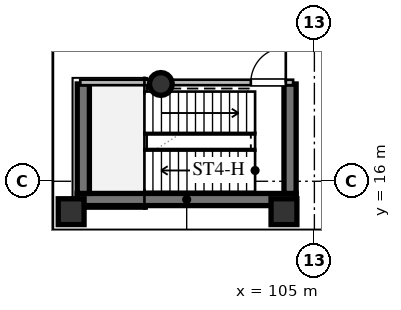
"""IFC4 building model, lengths in metres.
Left out: names, types, materials, properties, quantities, classifications, styles, units other than length and angle.
Written with IfcOpenShell. Run it as: python <this file> out.ifc"""

import sys

from ifc_helpers import new_model, si_unit, direction, frame, frame_2d, origin, origin_2d, place, context, subcontext, project, spatial, rectangle, circle, extrude, element, fill, save


model = new_model("IFC4")
c1 = context("Model", 3, precision=1e-05, world=origin(), true_north=direction((0.0, 1.0)))
c2 = subcontext(c1, "Body", "Model", "MODEL_VIEW")
j1 = project(units=[si_unit("LENGTHUNIT", "METRE"), si_unit("PLANEANGLEUNIT", "RADIAN")], contexts=[c1])
p1 = place(None, origin())
s1 = spatial("IfcSite", under=j1, at=p1, CompositionType="ELEMENT")
p2 = place(p1, origin())
s2 = spatial("IfcBuilding", under=s1, at=p2, CompositionType="ELEMENT")
p3 = place(p2, frame((0.0, 0.0, 4.8)))
s3 = spatial("IfcBuildingStorey", under=s2, at=p3, CompositionType="ELEMENT", Elevation=4.8)
for number, where, z_axis, x_axis in (
    (1, (97.0, 15.0, 0.0), (0.0, 0.0, 1.0), (1.0, 0.0, 0.0)),
    (2, (104.0, 15.0, 0.0), (0.0, 0.0, 1.0), (1.0, 0.0, 0.0)),
):
    element("IfcColumn", number, at=place(p3, frame(where, z_axis=z_axis, x_axis=x_axis)), inside=s3, PredefinedType="COLUMN", context=c2, shape_type="SweptSolid", body=[
        extrude(rectangle(XDim=0.85, YDim=0.85, at=origin_2d()), origin(), (0.0, 0.0, 1.0), 4.8),
    ])
p4 = place(p3, frame((97.2, 15.4, 0.0), z_axis=(0.0, 0.0, 1.0), x_axis=(1.0, 0.0, 0.0)))
e3 = element("IfcWall", 3, at=p4, inside=s3, PredefinedType="SHEAR", context=c2, shape_type="SweptSolid", body=[
    extrude(rectangle(XDim=7.2, YDim=0.4, at=frame_2d((3.6, 0.0))), origin(), (0.0, 0.0, 1.0), 4.52),
])
for number, where, z_axis, x_axis in (
    (4, (97.4, 15.6, 0.0), (0.0, 0.0, 1.0), (0.0, 1.0, 0.0)),
    (5, (104.2, 15.6, 0.0), (0.0, 0.0, 1.0), (0.0, 1.0, 0.0)),
):
    element("IfcWall", number, at=place(p3, frame(where, z_axis=z_axis, x_axis=x_axis)), inside=s3, PredefinedType="SHEAR", context=c2, shape_type="SweptSolid", body=[
        extrude(rectangle(XDim=3.6, YDim=0.4, at=frame_2d((1.8, 0.0))), origin(), (0.0, 0.0, 1.0), 4.52),
    ])
p5 = place(p3, frame((99.95, 19.2, 0.0), z_axis=(0.0, 0.0, 1.0), x_axis=(1.0, 0.0, 0.0)))
e6 = element("IfcColumn", 6, at=p5, inside=s3, PredefinedType="COLUMN", context=c2, shape_type="SweptSolid", body=[
    extrude(circle(Radius=0.375, at=origin_2d()), origin(), (0.0, 0.0, 1.0), 4.8),
])
p6 = place(p3, frame((96.2, 14.2, 0.0), z_axis=(0.0, 0.0, 1.0), x_axis=(1.0, 0.0, 0.0)))
e7 = element("IfcWall", 7, at=p6, inside=s3, PredefinedType="STANDARD", context=c2, shape_type="SweptSolid", body=[
    extrude(rectangle(XDim=11.8, YDim=0.4, at=frame_2d((5.9, 0.0))), origin(), (0.0, 0.0, 1.0), 4.52),
])
p7 = place(p3, frame((96.2, 28.0, 0.0), z_axis=(0.0, 0.0, 1.0), x_axis=(0.0, -1.0, 0.0)))
e8 = element("IfcWall", 8, at=p7, inside=s3, PredefinedType="STANDARD", context=c2, shape_type="SweptSolid", body=[
    extrude(rectangle(XDim=13.8, YDim=0.4, at=frame_2d((6.9, 0.0))), origin(), (0.0, 0.0, 1.0), 4.52),
])
p8 = place(p3, frame((97.3, 19.25, 0.0), z_axis=(0.0, 0.0, 1.0), x_axis=(1.0, 0.0, 0.0)))
e9 = element("IfcWall", 9, at=p8, inside=s3, PredefinedType="PARTITIONING", context=c2, shape_type="SweptSolid", body=[
    extrude(rectangle(XDim=7.0, YDim=0.18, at=frame_2d((3.5, 0.0))), origin(), (0.0, 0.0, 1.0), 4.52),
])
p9 = place(p8, frame((5.61, 0.0, 0.0)))
e10 = element("IfcOpeningElement", 10, at=p9, cuts=e9, PredefinedType="OPENING", context=c2, shape_type="SweptSolid", body=[
    extrude(rectangle(XDim=1.15, YDim=2.1, at=frame_2d((0.575, 1.05))), frame((0.0, 0.1, 0.0), z_axis=(0.0, -1.0, 0.0), x_axis=(1.0, 0.0, 0.0)), (0.0, 0.0, 1.0), 0.2),
])
p10 = place(p9, origin())
e11 = element("IfcDoor", 11, at=p10, inside=s3, OperationType="SINGLE_SWING_RIGHT", PredefinedType="DOOR", context=c2, shape_type="SweptSolid", body=[
    extrude(rectangle(XDim=1.15, YDim=2.1, at=frame_2d((0.575, 1.05))), frame((0.0, 0.025, 0.0), z_axis=(0.0, -1.0, 0.0), x_axis=(1.0, 0.0, 0.0)), (0.0, 0.0, 1.0), 0.05),
])
fill(e10, e11)
save(model, sys.argv[1])
